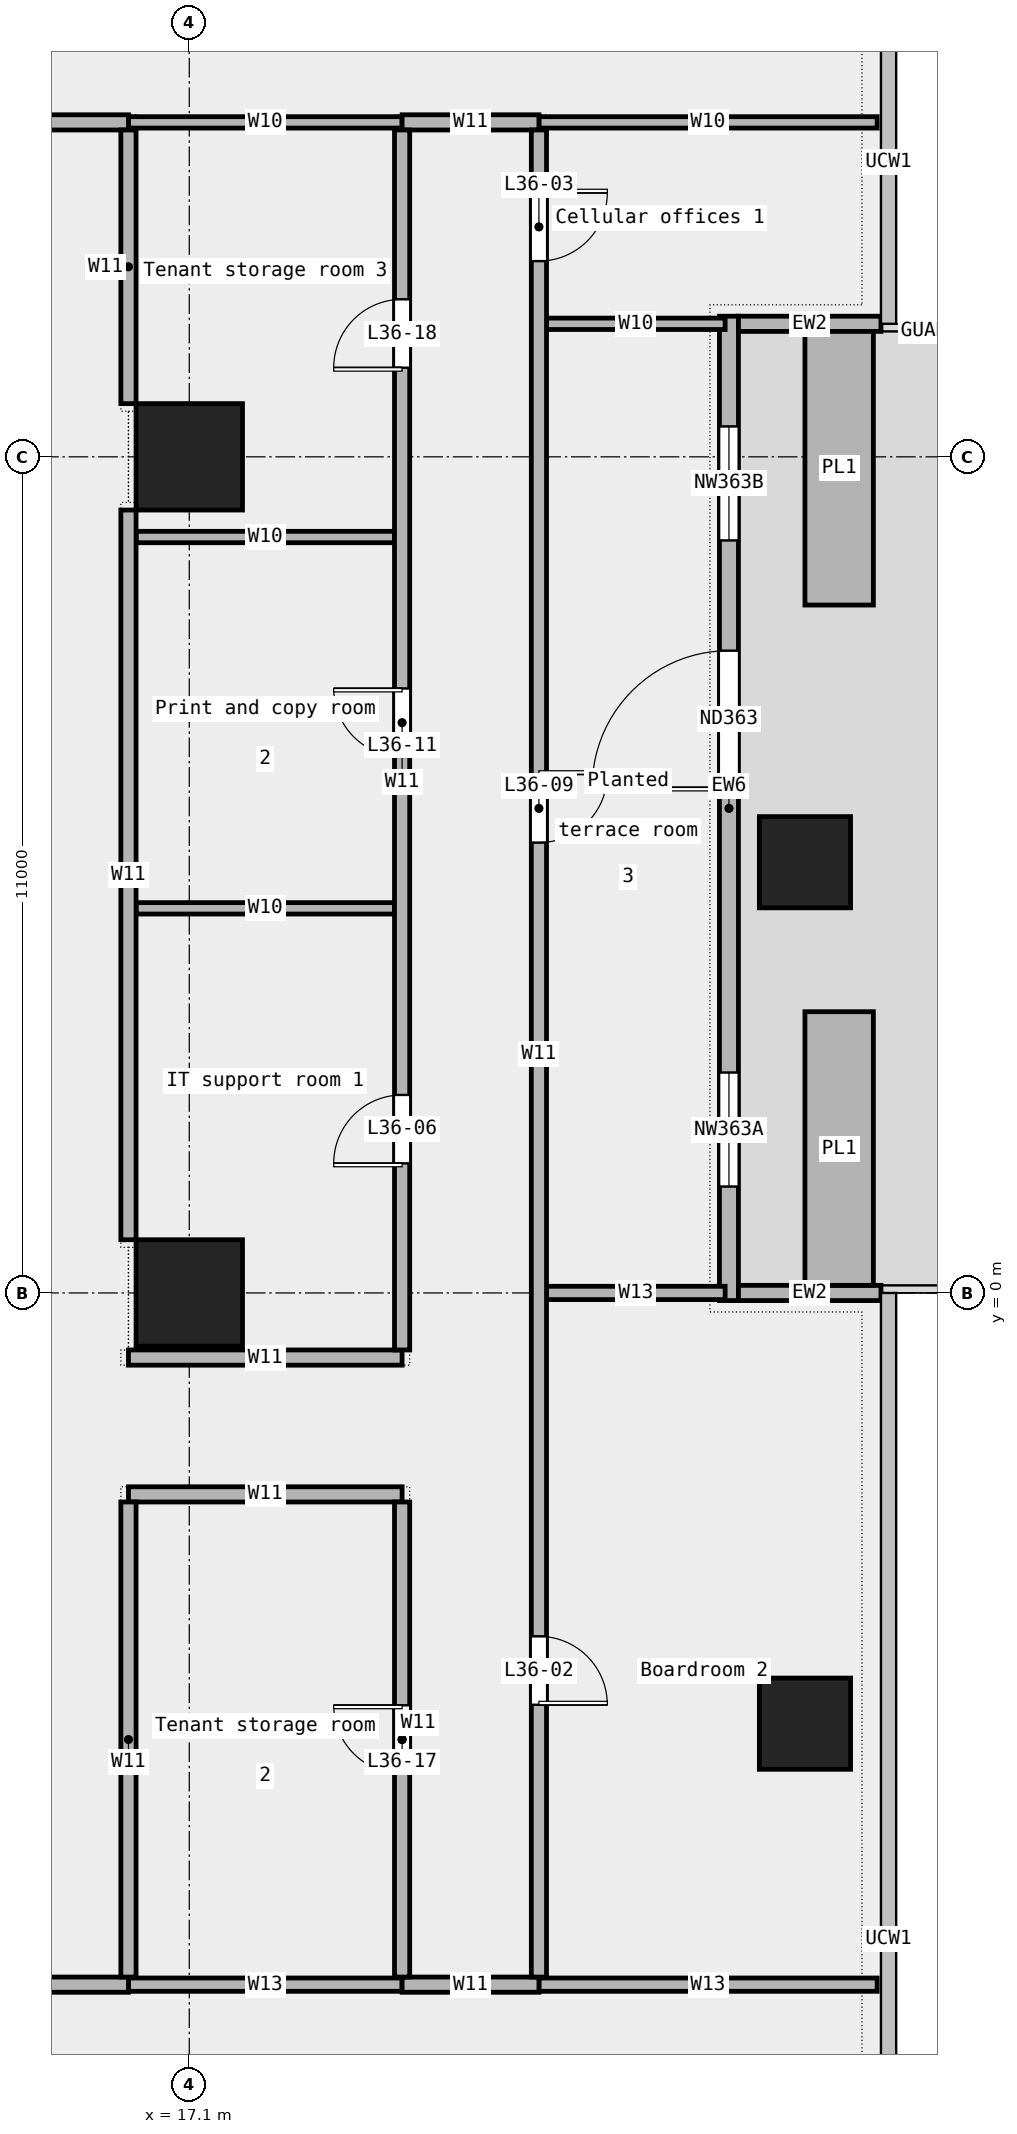
"""IFC4 building model, lengths in metres.
Left out: names, types, materials, properties, quantities, classifications, styles, units other than length and angle.
Written with IfcOpenShell. Run it as: python <this file> out.ifc"""

import sys

from ifc_helpers import new_model, si_unit, direction, frame, frame_2d, origin, origin_2d, place, context, subcontext, project, spatial, rectangle, extrude, element, fill, save


model = new_model("IFC4")
c1 = context("Model", 3, precision=1e-05, world=origin(), true_north=direction((0.0, 1.0)))
c2 = subcontext(c1, "Body", "Model", "MODEL_VIEW")
j1 = project(units=[si_unit("LENGTHUNIT", "METRE"), si_unit("PLANEANGLEUNIT", "RADIAN")], contexts=[c1])
p1 = place(None, origin())
s1 = spatial("IfcSite", under=j1, at=p1, CompositionType="ELEMENT")
p2 = place(p1, origin())
s2 = spatial("IfcBuilding", under=s1, at=p2, CompositionType="ELEMENT")
p3 = place(p2, frame((0.0, 0.0, 177.0)))
s3 = spatial("IfcBuildingStorey", under=s2, at=p3, CompositionType="ELEMENT", Elevation=177.0)
for number, where, z_axis, x_axis in (
    (1, (25.2, -5.667, 0.0), (0.0, 0.0, 1.0), (1.0, 0.0, 0.0)),
    (2, (25.2, 5.667, 0.0), (0.0, 0.0, 1.0), (1.0, 0.0, 0.0)),
):
    element("IfcColumn", number, at=place(p3, frame(where, z_axis=z_axis, x_axis=x_axis)), inside=s3, PredefinedType="COLUMN", context=c2, shape_type="SweptSolid", body=[
        extrude(rectangle(XDim=1.2, YDim=1.2, at=origin_2d()), origin(), (0.0, 0.0, 1.0), 3.6),
    ])
for number, where, z_axis, x_axis in (
    (3, (17.1, 0.0, 0.0), (0.0, 0.0, 1.0), (1.0, 0.0, 0.0)),
    (4, (17.1, 11.0, 0.0), (0.0, 0.0, 1.0), (1.0, 0.0, 0.0)),
):
    element("IfcColumn", number, at=place(p3, frame(where, z_axis=z_axis, x_axis=x_axis)), inside=s3, PredefinedType="COLUMN", context=c2, shape_type="SweptSolid", body=[
        extrude(rectangle(XDim=1.4, YDim=1.4, at=origin_2d()), origin(), (0.0, 0.0, 1.0), 3.6),
    ])
p4 = place(p3, frame((24.2, -0.1, 0.0), z_axis=(0.0, 0.0, 1.0), x_axis=(0.0, 1.0, 0.0)))
e5 = element("IfcWall", 5, at=p4, inside=s3, PredefinedType="STANDARD", context=c2, shape_type="SweptSolid", body=[
    extrude(rectangle(XDim=12.95, YDim=0.25, at=frame_2d((6.475, 0.0))), origin(), (0.0, 0.0, 1.0), 3.6),
])
p5 = place(p4, frame((1.5, 0.0, 0.45)))
e6 = element("IfcOpeningElement", 6, at=p5, cuts=e5, PredefinedType="OPENING", context=c2, shape_type="SweptSolid", body=[
    extrude(rectangle(XDim=1.5, YDim=2.4, at=frame_2d((0.75, 1.2))), frame((0.0, 0.137, 0.0), z_axis=(0.0, -1.0, 0.0), x_axis=(1.0, 0.0, 0.0)), (0.0, 0.0, 1.0), 0.274),
])
p6 = place(p4, frame((6.75, 0.0, 0.0)))
e7 = element("IfcOpeningElement", 7, at=p6, cuts=e5, PredefinedType="OPENING", context=c2, shape_type="SweptSolid", body=[
    extrude(rectangle(XDim=1.8, YDim=2.4, at=frame_2d((0.9, 1.2))), frame((0.0, 0.137, 0.0), z_axis=(0.0, -1.0, 0.0), x_axis=(1.0, 0.0, 0.0)), (0.0, 0.0, 1.0), 0.274),
])
p7 = place(p4, frame((10.0, 0.0, 0.45)))
e8 = element("IfcOpeningElement", 8, at=p7, cuts=e5, PredefinedType="OPENING", context=c2, shape_type="SweptSolid", body=[
    extrude(rectangle(XDim=1.5, YDim=2.4, at=frame_2d((0.75, 1.2))), frame((0.0, 0.137, 0.0), z_axis=(0.0, -1.0, 0.0), x_axis=(1.0, 0.0, 0.0)), (0.0, 0.0, 1.0), 0.274),
])
for number, where, z_axis, x_axis in (
    (9, (26.2, 0.0, 0.0), (0.0, 0.0, 1.0), (-1.0, 0.0, 0.0)),
    (10, (26.2, 12.75, 0.0), (0.0, 0.0, 1.0), (-1.0, 0.0, 0.0)),
):
    element("IfcWall", number, at=place(p3, frame(where, z_axis=z_axis, x_axis=x_axis)), inside=s3, PredefinedType="STANDARD", context=c2, shape_type="SweptSolid", body=[
        extrude(rectangle(XDim=1.875, YDim=0.2, at=frame_2d((0.938, 0.0))), origin(), (0.0, 0.0, 1.0), 3.6),
    ])
for number, where, z_axis, x_axis in (
    (11, (25.65, 0.1, 0.0), (0.0, 0.0, 1.0), (0.0, 1.0, 0.0)),
    (12, (25.65, 9.05, 0.0), (0.0, 0.0, 1.0), (0.0, 1.0, 0.0)),
):
    element("IfcWall", number, at=place(p3, frame(where, z_axis=z_axis, x_axis=x_axis)), inside=s3, PredefinedType="STANDARD", context=c2, shape_type="SweptSolid", body=[
        extrude(rectangle(XDim=3.6, YDim=0.9, at=frame_2d((1.8, 0.0))), origin(), (0.0, 0.0, 1.0), 0.7),
    ])
p8 = place(p3, frame((16.3, -9.1, 0.0), z_axis=(0.0, 0.0, 1.0), x_axis=(1.0, 0.0, 0.0)))
e13 = element("IfcWall", 13, at=p8, inside=s3, PredefinedType="PARTITIONING", context=c2, shape_type="SweptSolid", body=[
    extrude(rectangle(XDim=3.6, YDim=0.175, at=frame_2d((1.8, 0.0))), origin(), (0.0, 0.0, 1.0), 3.6),
])
p9 = place(p3, frame((21.7, -9.1, 0.0), z_axis=(0.0, 0.0, 1.0), x_axis=(1.0, 0.0, 0.0)))
e14 = element("IfcWall", 14, at=p9, inside=s3, PredefinedType="PARTITIONING", context=c2, shape_type="SweptSolid", body=[
    extrude(rectangle(XDim=4.45, YDim=0.175, at=frame_2d((2.225, 0.0))), origin(), (0.0, 0.0, 1.0), 3.6),
])
p10 = place(p3, frame((-3.04, -9.1, 0.0), z_axis=(0.0, 0.0, 1.0), x_axis=(1.0, 0.0, 0.0)))
e15 = element("IfcWall", 15, at=p10, inside=s3, PredefinedType="PARTITIONING", context=c2, shape_type="SweptSolid", body=[
    extrude(rectangle(XDim=19.34, YDim=0.2, at=frame_2d((9.67, 0.0))), origin(), (0.0, 0.0, 1.0), 3.6),
])
p11 = place(p10, frame((5.942, 0.0, 0.0)))
e16 = element("IfcOpeningElement", 16, at=p11, cuts=e15, PredefinedType="OPENING", context=c2, shape_type="SweptSolid", body=[
    extrude(rectangle(XDim=1.0, YDim=2.1, at=frame_2d((0.5, 1.05))), frame((0.0, 0.112, 0.0), z_axis=(0.0, -1.0, 0.0), x_axis=(1.0, 0.0, 0.0)), (0.0, 0.0, 1.0), 0.224),
])
p12 = place(p3, frame((19.9, -9.1, 0.0), z_axis=(0.0, 0.0, 1.0), x_axis=(1.0, 0.0, 0.0)))
e17 = element("IfcWall", 17, at=p12, inside=s3, PredefinedType="PARTITIONING", context=c2, shape_type="SweptSolid", body=[
    extrude(rectangle(XDim=1.8, YDim=0.2, at=frame_2d((0.9, 0.0))), origin(), (0.0, 0.0, 1.0), 3.6),
])
for number, where, z_axis, x_axis in (
    (18, (16.3, -2.65, 0.0), (0.0, 0.0, 1.0), (1.0, 0.0, 0.0)),
    (19, (16.3, -0.85, 0.0), (0.0, 0.0, 1.0), (1.0, 0.0, 0.0)),
):
    element("IfcWall", number, at=place(p3, frame(where, z_axis=z_axis, x_axis=x_axis)), inside=s3, PredefinedType="PARTITIONING", context=c2, shape_type="SweptSolid", body=[
        extrude(rectangle(XDim=3.6, YDim=0.2, at=frame_2d((1.8, 0.0))), origin(), (0.0, 0.0, 1.0), 3.6),
    ])
p13 = place(p3, frame((21.8, 0.0, 0.0), z_axis=(0.0, 0.0, 1.0), x_axis=(1.0, 0.0, 0.0)))
e20 = element("IfcWall", 20, at=p13, inside=s3, PredefinedType="PARTITIONING", context=c2, shape_type="SweptSolid", body=[
    extrude(rectangle(XDim=2.35, YDim=0.175, at=frame_2d((1.175, 0.0))), origin(), (0.0, 0.0, 1.0), 3.6),
])
for number, where, z_axis, x_axis in (
    (21, (16.4, 5.06, 0.0), (0.0, 0.0, 1.0), (1.0, 0.0, 0.0)),
    (22, (16.4, 9.945, 0.0), (0.0, 0.0, 1.0), (1.0, 0.0, 0.0)),
):
    element("IfcWall", number, at=place(p3, frame(where, z_axis=z_axis, x_axis=x_axis)), inside=s3, PredefinedType="PARTITIONING", context=c2, shape_type="SweptSolid", body=[
        extrude(rectangle(XDim=3.4, YDim=0.15, at=frame_2d((1.7, 0.0))), origin(), (0.0, 0.0, 1.0), 3.6),
    ])
p14 = place(p3, frame((21.8, 12.75, 0.0), z_axis=(0.0, 0.0, 1.0), x_axis=(1.0, 0.0, 0.0)))
e23 = element("IfcWall", 23, at=p14, inside=s3, PredefinedType="PARTITIONING", context=c2, shape_type="SweptSolid", body=[
    extrude(rectangle(XDim=2.35, YDim=0.15, at=frame_2d((1.175, 0.0))), origin(), (0.0, 0.0, 1.0), 3.6),
])
p15 = place(p3, frame((16.3, 15.4, 0.0), z_axis=(0.0, 0.0, 1.0), x_axis=(1.0, 0.0, 0.0)))
e24 = element("IfcWall", 24, at=p15, inside=s3, PredefinedType="PARTITIONING", context=c2, shape_type="SweptSolid", body=[
    extrude(rectangle(XDim=3.6, YDim=0.15, at=frame_2d((1.8, 0.0))), origin(), (0.0, 0.0, 1.0), 3.6),
])
p16 = place(p3, frame((21.7, 15.4, 0.0), z_axis=(0.0, 0.0, 1.0), x_axis=(1.0, 0.0, 0.0)))
e25 = element("IfcWall", 25, at=p16, inside=s3, PredefinedType="PARTITIONING", context=c2, shape_type="SweptSolid", body=[
    extrude(rectangle(XDim=4.45, YDim=0.15, at=frame_2d((2.225, 0.0))), origin(), (0.0, 0.0, 1.0), 3.6),
])
p17 = place(p3, frame((-16.3, 15.4, 0.0), z_axis=(0.0, 0.0, 1.0), x_axis=(1.0, 0.0, 0.0)))
e26 = element("IfcWall", 26, at=p17, inside=s3, PredefinedType="PARTITIONING", context=c2, shape_type="SweptSolid", body=[
    extrude(rectangle(XDim=32.6, YDim=0.2, at=frame_2d((16.3, 0.0))), origin(), (0.0, 0.0, 1.0), 3.6),
])
p18 = place(p17, frame((24.415, 0.0, 0.0)))
e27 = element("IfcOpeningElement", 27, at=p18, cuts=e26, PredefinedType="OPENING", context=c2, shape_type="SweptSolid", body=[
    extrude(rectangle(XDim=1.8, YDim=2.1, at=frame_2d((0.9, 1.05))), frame((0.0, 0.112, 0.0), z_axis=(0.0, -1.0, 0.0), x_axis=(1.0, 0.0, 0.0)), (0.0, 0.0, 1.0), 0.224),
])
p19 = place(p17, frame((12.24, 0.0, 0.0)))
e28 = element("IfcOpeningElement", 28, at=p19, cuts=e26, PredefinedType="OPENING", context=c2, shape_type="SweptSolid", body=[
    extrude(rectangle(XDim=1.2, YDim=2.1, at=frame_2d((0.6, 1.05))), frame((0.0, 0.112, 0.0), z_axis=(0.0, -1.0, 0.0), x_axis=(1.0, 0.0, 0.0)), (0.0, 0.0, 1.0), 0.224),
])
p20 = place(p17, frame((3.075, 0.0, 0.0)))
e29 = element("IfcOpeningElement", 29, at=p20, cuts=e26, PredefinedType="OPENING", context=c2, shape_type="SweptSolid", body=[
    extrude(rectangle(XDim=1.5, YDim=2.1, at=frame_2d((0.75, 1.05))), frame((0.0, 0.112, 0.0), z_axis=(0.0, -1.0, 0.0), x_axis=(1.0, 0.0, 0.0)), (0.0, 0.0, 1.0), 0.224),
])
p21 = place(p3, frame((19.9, 15.4, 0.0), z_axis=(0.0, 0.0, 1.0), x_axis=(1.0, 0.0, 0.0)))
e30 = element("IfcWall", 30, at=p21, inside=s3, PredefinedType="PARTITIONING", context=c2, shape_type="SweptSolid", body=[
    extrude(rectangle(XDim=1.8, YDim=0.2, at=frame_2d((0.9, 0.0))), origin(), (0.0, 0.0, 1.0), 3.6),
])
p22 = place(p3, frame((16.3, -9.0, 0.0), z_axis=(0.0, 0.0, 1.0), x_axis=(0.0, 1.0, 0.0)))
e31 = element("IfcWall", 31, at=p22, inside=s3, PredefinedType="PARTITIONING", context=c2, shape_type="SweptSolid", body=[
    extrude(rectangle(XDim=6.25, YDim=0.2, at=frame_2d((3.125, 0.0))), origin(), (0.0, 0.0, 1.0), 3.6),
])
p23 = place(p3, frame((16.3, 0.7, 0.0), z_axis=(0.0, 0.0, 1.0), x_axis=(0.0, 1.0, 0.0)))
e32 = element("IfcWall", 32, at=p23, inside=s3, PredefinedType="PARTITIONING", context=c2, shape_type="SweptSolid", body=[
    extrude(rectangle(XDim=9.6, YDim=0.2, at=frame_2d((4.8, 0.0))), origin(), (0.0, 0.0, 1.0), 3.6),
])
p24 = place(p3, frame((16.3, 11.7, 0.0), z_axis=(0.0, 0.0, 1.0), x_axis=(0.0, 1.0, 0.0)))
e33 = element("IfcWall", 33, at=p24, inside=s3, PredefinedType="PARTITIONING", context=c2, shape_type="SweptSolid", body=[
    extrude(rectangle(XDim=3.6, YDim=0.2, at=frame_2d((1.8, 0.0))), origin(), (0.0, 0.0, 1.0), 3.6),
])
p25 = place(p3, frame((19.9, -9.0, 0.0), z_axis=(0.0, 0.0, 1.0), x_axis=(0.0, 1.0, 0.0)))
e34 = element("IfcWall", 34, at=p25, inside=s3, PredefinedType="PARTITIONING", context=c2, shape_type="SweptSolid", body=[
    extrude(rectangle(XDim=6.25, YDim=0.2, at=frame_2d((3.125, 0.0))), origin(), (0.0, 0.0, 1.0), 3.6),
])
p26 = place(p25, frame((2.675, 0.0, 0.0)))
e35 = element("IfcOpeningElement", 35, at=p26, cuts=e34, PredefinedType="OPENING", context=c2, shape_type="SweptSolid", body=[
    extrude(rectangle(XDim=0.9, YDim=2.1, at=frame_2d((0.45, 1.05))), frame((0.0, 0.112, 0.0), z_axis=(0.0, -1.0, 0.0), x_axis=(1.0, 0.0, 0.0)), (0.0, 0.0, 1.0), 0.224),
])
p27 = place(p3, frame((19.9, -0.75, 0.0), z_axis=(0.0, 0.0, 1.0), x_axis=(0.0, 1.0, 0.0)))
e36 = element("IfcWall", 36, at=p27, inside=s3, PredefinedType="PARTITIONING", context=c2, shape_type="SweptSolid", body=[
    extrude(rectangle(XDim=16.05, YDim=0.2, at=frame_2d((8.025, 0.0))), origin(), (0.0, 0.0, 1.0), 3.6),
])
p28 = place(p27, frame((2.455, 0.0, 0.0)))
e37 = element("IfcOpeningElement", 37, at=p28, cuts=e36, PredefinedType="OPENING", context=c2, shape_type="SweptSolid", body=[
    extrude(rectangle(XDim=0.9, YDim=2.1, at=frame_2d((0.45, 1.05))), frame((0.0, 0.112, 0.0), z_axis=(0.0, -1.0, 0.0), x_axis=(1.0, 0.0, 0.0)), (0.0, 0.0, 1.0), 0.224),
])
p29 = place(p27, frame((7.802, 0.0, 0.0)))
e38 = element("IfcOpeningElement", 38, at=p29, cuts=e36, PredefinedType="OPENING", context=c2, shape_type="SweptSolid", body=[
    extrude(rectangle(XDim=0.9, YDim=2.1, at=frame_2d((0.45, 1.05))), frame((0.0, 0.112, 0.0), z_axis=(0.0, -1.0, 0.0), x_axis=(1.0, 0.0, 0.0)), (0.0, 0.0, 1.0), 0.224),
])
p30 = place(p27, frame((12.923, 0.0, 0.0)))
e39 = element("IfcOpeningElement", 39, at=p30, cuts=e36, PredefinedType="OPENING", context=c2, shape_type="SweptSolid", body=[
    extrude(rectangle(XDim=0.9, YDim=2.1, at=frame_2d((0.45, 1.05))), frame((0.0, 0.112, 0.0), z_axis=(0.0, -1.0, 0.0), x_axis=(1.0, 0.0, 0.0)), (0.0, 0.0, 1.0), 0.224),
])
p31 = place(p3, frame((21.7, -9.0, 0.0), z_axis=(0.0, 0.0, 1.0), x_axis=(0.0, 1.0, 0.0)))
e40 = element("IfcWall", 40, at=p31, inside=s3, PredefinedType="PARTITIONING", context=c2, shape_type="SweptSolid", body=[
    extrude(rectangle(XDim=24.3, YDim=0.2, at=frame_2d((12.15, 0.0))), origin(), (0.0, 0.0, 1.0), 3.6),
])
p32 = place(p31, frame((3.583, 0.0, 0.0)))
e41 = element("IfcOpeningElement", 41, at=p32, cuts=e40, PredefinedType="OPENING", context=c2, shape_type="SweptSolid", body=[
    extrude(rectangle(XDim=0.9, YDim=2.1, at=frame_2d((0.45, 1.05))), frame((0.0, 0.112, 0.0), z_axis=(0.0, -1.0, 0.0), x_axis=(1.0, 0.0, 0.0)), (0.0, 0.0, 1.0), 0.224),
])
p33 = place(p31, frame((22.575, 0.0, 0.0)))
e42 = element("IfcOpeningElement", 42, at=p33, cuts=e40, PredefinedType="OPENING", context=c2, shape_type="SweptSolid", body=[
    extrude(rectangle(XDim=0.9, YDim=2.1, at=frame_2d((0.45, 1.05))), frame((0.0, 0.112, 0.0), z_axis=(0.0, -1.0, 0.0), x_axis=(1.0, 0.0, 0.0)), (0.0, 0.0, 1.0), 0.224),
])
p34 = place(p31, frame((14.925, 0.0, 0.0)))
e43 = element("IfcOpeningElement", 43, at=p34, cuts=e40, PredefinedType="OPENING", context=c2, shape_type="SweptSolid", body=[
    extrude(rectangle(XDim=0.9, YDim=2.1, at=frame_2d((0.45, 1.05))), frame((0.0, 0.112, 0.0), z_axis=(0.0, -1.0, 0.0), x_axis=(1.0, 0.0, 0.0)), (0.0, 0.0, 1.0), 0.224),
])
p35 = place(p5, origin())
e44 = element("IfcWindow", 44, at=p35, inside=s3, PartitioningType="SINGLE_PANEL", PredefinedType="WINDOW", context=c2, shape_type="SweptSolid", body=[
    extrude(rectangle(XDim=1.5, YDim=2.4, at=frame_2d((0.75, 1.2))), frame((0.0, 0.03, 0.0), z_axis=(0.0, -1.0, 0.0), x_axis=(1.0, 0.0, 0.0)), (0.0, 0.0, 1.0), 0.06),
])
fill(e6, e44)
p36 = place(p6, origin())
e45 = element("IfcDoor", 45, at=p36, inside=s3, OperationType="DOUBLE_DOOR_SINGLE_SWING", PredefinedType="DOOR", context=c2, shape_type="SweptSolid", body=[
    extrude(rectangle(XDim=1.8, YDim=2.4, at=frame_2d((0.9, 1.2))), frame((0.0, 0.025, 0.0), z_axis=(0.0, -1.0, 0.0), x_axis=(1.0, 0.0, 0.0)), (0.0, 0.0, 1.0), 0.05),
])
fill(e7, e45)
p37 = place(p7, origin())
e46 = element("IfcWindow", 46, at=p37, inside=s3, PartitioningType="SINGLE_PANEL", PredefinedType="WINDOW", context=c2, shape_type="SweptSolid", body=[
    extrude(rectangle(XDim=1.5, YDim=2.4, at=frame_2d((0.75, 1.2))), frame((0.0, 0.03, 0.0), z_axis=(0.0, -1.0, 0.0), x_axis=(1.0, 0.0, 0.0)), (0.0, 0.0, 1.0), 0.06),
])
fill(e8, e46)
p38 = place(p32, origin())
e47 = element("IfcDoor", 47, at=p38, inside=s3, OperationType="SINGLE_SWING_RIGHT", PredefinedType="DOOR", context=c2, shape_type="SweptSolid", body=[
    extrude(rectangle(XDim=0.9, YDim=2.1, at=frame_2d((0.45, 1.05))), frame((0.0, 0.025, 0.0), z_axis=(0.0, -1.0, 0.0), x_axis=(1.0, 0.0, 0.0)), (0.0, 0.0, 1.0), 0.05),
])
fill(e41, e47)
p39 = place(p33, origin())
e48 = element("IfcDoor", 48, at=p39, inside=s3, OperationType="SINGLE_SWING_LEFT", PredefinedType="DOOR", context=c2, shape_type="SweptSolid", body=[
    extrude(rectangle(XDim=0.9, YDim=2.1, at=frame_2d((0.45, 1.05))), frame((0.0, 0.025, 0.0), z_axis=(0.0, -1.0, 0.0), x_axis=(1.0, 0.0, 0.0)), (0.0, 0.0, 1.0), 0.05),
])
fill(e42, e48)
p40 = place(p28, origin())
e49 = element("IfcDoor", 49, at=p40, inside=s3, OperationType="SINGLE_SWING_LEFT", PredefinedType="DOOR", context=c2, shape_type="SweptSolid", body=[
    extrude(rectangle(XDim=0.9, YDim=2.1, at=frame_2d((0.45, 1.05))), frame((0.0, 0.025, 0.0), z_axis=(0.0, -1.0, 0.0), x_axis=(1.0, 0.0, 0.0)), (0.0, 0.0, 1.0), 0.05),
])
fill(e37, e49)
p41 = place(p34, origin())
e50 = element("IfcDoor", 50, at=p41, inside=s3, OperationType="SINGLE_SWING_LEFT", PredefinedType="DOOR", context=c2, shape_type="SweptSolid", body=[
    extrude(rectangle(XDim=0.9, YDim=2.1, at=frame_2d((0.45, 1.05))), frame((0.0, 0.025, 0.0), z_axis=(0.0, -1.0, 0.0), x_axis=(1.0, 0.0, 0.0)), (0.0, 0.0, 1.0), 0.05),
])
fill(e43, e50)
p42 = place(p29, origin())
e51 = element("IfcDoor", 51, at=p42, inside=s3, OperationType="SINGLE_SWING_RIGHT", PredefinedType="DOOR", context=c2, shape_type="SweptSolid", body=[
    extrude(rectangle(XDim=0.9, YDim=2.1, at=frame_2d((0.45, 1.05))), frame((0.0, 0.025, 0.0), z_axis=(0.0, -1.0, 0.0), x_axis=(1.0, 0.0, 0.0)), (0.0, 0.0, 1.0), 0.05),
])
fill(e38, e51)
p43 = place(p26, origin())
e52 = element("IfcDoor", 52, at=p43, inside=s3, OperationType="SINGLE_SWING_RIGHT", PredefinedType="DOOR", context=c2, shape_type="SweptSolid", body=[
    extrude(rectangle(XDim=0.9, YDim=2.1, at=frame_2d((0.45, 1.05))), frame((0.0, 0.025, 0.0), z_axis=(0.0, -1.0, 0.0), x_axis=(1.0, 0.0, 0.0)), (0.0, 0.0, 1.0), 0.05),
])
fill(e35, e52)
p44 = place(p30, origin())
e53 = element("IfcDoor", 53, at=p44, inside=s3, OperationType="SINGLE_SWING_LEFT", PredefinedType="DOOR", context=c2, shape_type="SweptSolid", body=[
    extrude(rectangle(XDim=0.9, YDim=2.1, at=frame_2d((0.45, 1.05))), frame((0.0, 0.025, 0.0), z_axis=(0.0, -1.0, 0.0), x_axis=(1.0, 0.0, 0.0)), (0.0, 0.0, 1.0), 0.05),
])
fill(e39, e53)
save(model, sys.argv[1])
